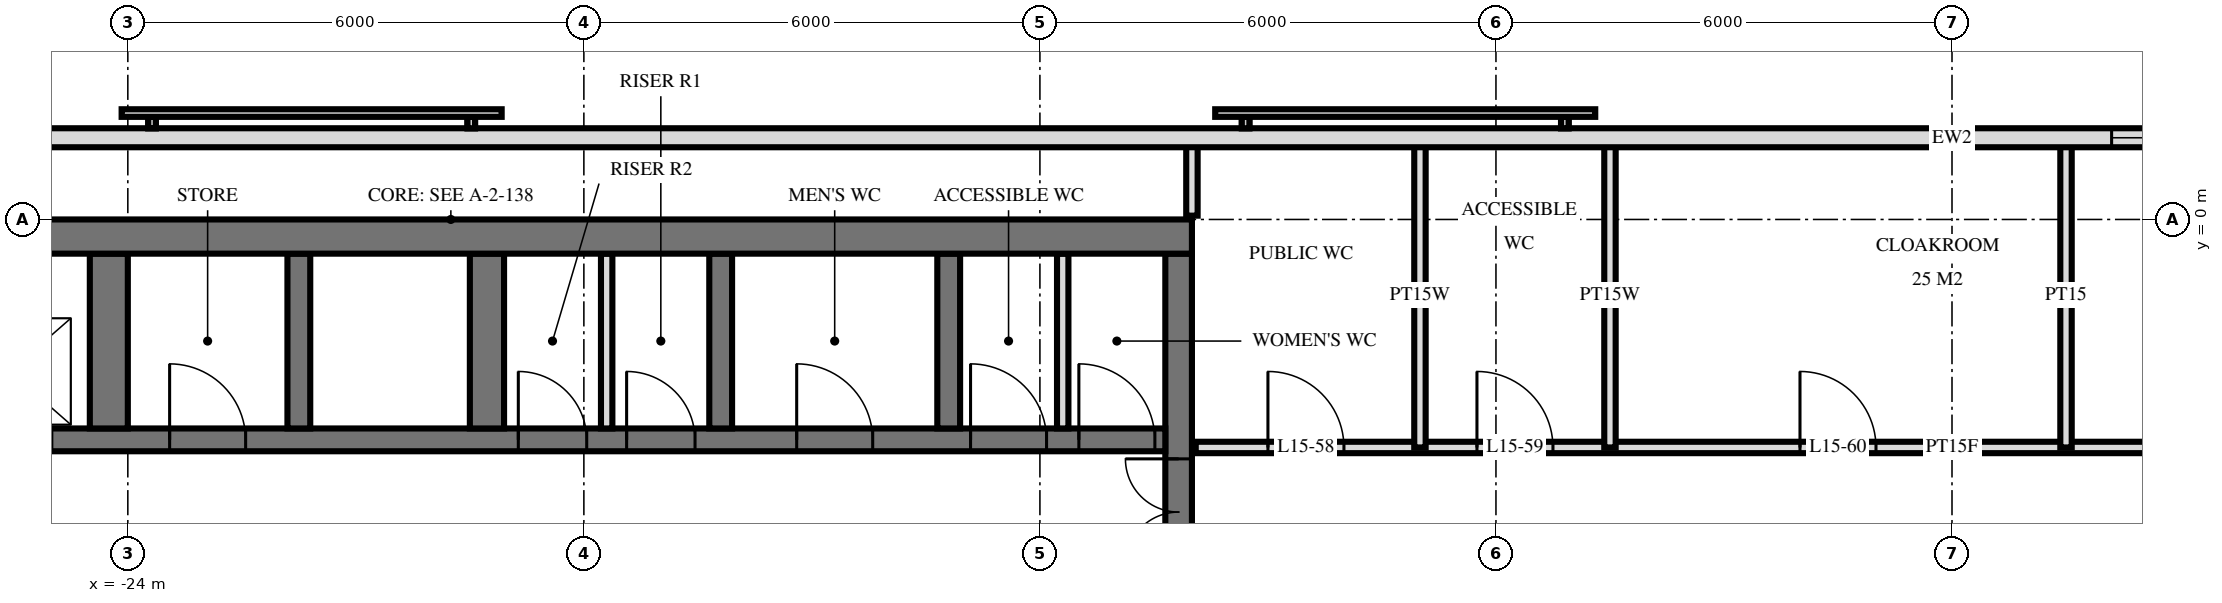
"""IFC4 building model, lengths in metres.
Left out: names, types, materials, properties, quantities, classifications, styles, units other than length and angle.
Written with IfcOpenShell. Run it as: python <this file> out.ifc"""

import sys

from ifc_helpers import new_model, si_unit, direction, frame, frame_2d, origin, place, context, subcontext, project, spatial, rectangle, extrude, element, fill, save


model = new_model("IFC4")
c1 = context("Model", 3, precision=1e-05, world=origin(), true_north=direction((0.0, 1.0)))
c2 = subcontext(c1, "Body", "Model", "MODEL_VIEW")
j1 = project(units=[si_unit("LENGTHUNIT", "METRE"), si_unit("PLANEANGLEUNIT", "RADIAN")], contexts=[c1])
p1 = place(None, origin())
s1 = spatial("IfcSite", under=j1, at=p1, CompositionType="ELEMENT")
p2 = place(p1, origin())
s2 = spatial("IfcBuilding", under=s1, at=p2, CompositionType="ELEMENT")
p3 = place(p2, frame((0.0, 0.0, 63.6)))
s3 = spatial("IfcBuildingStorey", under=s2, at=p3, CompositionType="ELEMENT", Elevation=63.6)
p4 = place(p3, frame((-29.5, -0.225, 0.0), z_axis=(0.0, 0.0, 1.0), x_axis=(1.0, 0.0, 0.0)))
e1 = element("IfcWall", 1, at=p4, inside=s3, PredefinedType="SHEAR", context=c2, shape_type="SweptSolid", body=[
    extrude(rectangle(XDim=19.5, YDim=0.45, at=frame_2d((9.75, 0.0))), origin(), (0.0, 0.0, 1.0), 3.6),
])
p5 = place(p3, frame((-10.175, -14.55, 0.0), z_axis=(0.0, 0.0, 1.0), x_axis=(0.0, 1.0, 0.0)))
e2 = element("IfcWall", 2, at=p5, inside=s3, PredefinedType="SHEAR", context=c2, shape_type="SweptSolid", body=[
    extrude(rectangle(XDim=14.1, YDim=0.35, at=frame_2d((7.05, 0.0))), origin(), (0.0, 0.0, 1.0), 3.6),
])
p6 = place(p5, frame((8.4, 0.0, 0.0)))
e3 = element("IfcOpeningElement", 3, at=p6, cuts=e2, PredefinedType="OPENING", context=c2, shape_type="SweptSolid", body=[
    extrude(rectangle(XDim=1.4, YDim=2.4, at=frame_2d((0.7, 1.2))), frame((0.0, 0.185, 0.0), z_axis=(0.0, -1.0, 0.0), x_axis=(1.0, 0.0, 0.0)), (0.0, 0.0, 1.0), 0.37),
])
p7 = place(p5, frame((10.0, 0.0, 0.0)))
e4 = element("IfcOpeningElement", 4, at=p7, cuts=e2, PredefinedType="OPENING", context=c2, shape_type="SweptSolid", body=[
    extrude(rectangle(XDim=1.4, YDim=2.4, at=frame_2d((0.7, 1.2))), frame((0.0, 0.185, 0.0), z_axis=(0.0, -1.0, 0.0), x_axis=(1.0, 0.0, 0.0)), (0.0, 0.0, 1.0), 0.37),
])
p8 = place(p5, frame((4.0, 0.0, 0.0)))
e5 = element("IfcOpeningElement", 5, at=p8, cuts=e2, PredefinedType="OPENING", context=c2, shape_type="SweptSolid", body=[
    extrude(rectangle(XDim=1.2, YDim=2.1, at=frame_2d((0.6, 1.05))), frame((0.0, 0.185, 0.0), z_axis=(0.0, -1.0, 0.0), x_axis=(1.0, 0.0, 0.0)), (0.0, 0.0, 1.0), 0.37),
])
p9 = place(p3, frame((-29.05, -2.9, 0.0), z_axis=(0.0, 0.0, 1.0), x_axis=(1.0, 0.0, 0.0)))
e6 = element("IfcWall", 6, at=p9, inside=s3, PredefinedType="SHEAR", context=c2, shape_type="SweptSolid", body=[
    extrude(rectangle(XDim=18.7, YDim=0.3, at=frame_2d((9.35, 0.0))), origin(), (0.0, 0.0, 1.0), 3.6),
])
p10 = place(p9, frame((2.95, 0.0, 0.0)))
e7 = element("IfcOpeningElement", 7, at=p10, cuts=e6, PredefinedType="OPENING", context=c2, shape_type="SweptSolid", body=[
    extrude(rectangle(XDim=1.1, YDim=2.1, at=frame_2d((0.55, 1.05))), frame((0.0, 0.16, 0.0), z_axis=(0.0, -1.0, 0.0), x_axis=(1.0, 0.0, 0.0)), (0.0, 0.0, 1.0), 0.32),
])
p11 = place(p9, frame((0.55, 0.0, 0.0)))
e8 = element("IfcOpeningElement", 8, at=p11, cuts=e6, PredefinedType="OPENING", context=c2, shape_type="SweptSolid", body=[
    extrude(rectangle(XDim=1.1, YDim=2.1, at=frame_2d((0.55, 1.05))), frame((0.0, 0.16, 0.0), z_axis=(0.0, -1.0, 0.0), x_axis=(1.0, 0.0, 0.0)), (0.0, 0.0, 1.0), 0.32),
])
p12 = place(p9, frame((11.613, 0.0, 0.0)))
e9 = element("IfcOpeningElement", 9, at=p12, cuts=e6, PredefinedType="OPENING", context=c2, shape_type="SweptSolid", body=[
    extrude(rectangle(XDim=0.9, YDim=2.1, at=frame_2d((0.45, 1.05))), frame((0.0, 0.16, 0.0), z_axis=(0.0, -1.0, 0.0), x_axis=(1.0, 0.0, 0.0)), (0.0, 0.0, 1.0), 0.32),
])
p13 = place(p9, frame((10.188, 0.0, 0.0)))
e10 = element("IfcOpeningElement", 10, at=p13, cuts=e6, PredefinedType="OPENING", context=c2, shape_type="SweptSolid", body=[
    extrude(rectangle(XDim=0.9, YDim=2.1, at=frame_2d((0.45, 1.05))), frame((0.0, 0.16, 0.0), z_axis=(0.0, -1.0, 0.0), x_axis=(1.0, 0.0, 0.0)), (0.0, 0.0, 1.0), 0.32),
])
p14 = place(p9, frame((17.562, 0.0, 0.0)))
e11 = element("IfcOpeningElement", 11, at=p14, cuts=e6, PredefinedType="OPENING", context=c2, shape_type="SweptSolid", body=[
    extrude(rectangle(XDim=1.0, YDim=2.1, at=frame_2d((0.5, 1.05))), frame((0.0, 0.16, 0.0), z_axis=(0.0, -1.0, 0.0), x_axis=(1.0, 0.0, 0.0)), (0.0, 0.0, 1.0), 0.32),
])
p15 = place(p9, frame((16.137, 0.0, 0.0)))
e12 = element("IfcOpeningElement", 12, at=p15, cuts=e6, PredefinedType="OPENING", context=c2, shape_type="SweptSolid", body=[
    extrude(rectangle(XDim=1.0, YDim=2.1, at=frame_2d((0.5, 1.05))), frame((0.0, 0.16, 0.0), z_axis=(0.0, -1.0, 0.0), x_axis=(1.0, 0.0, 0.0)), (0.0, 0.0, 1.0), 0.32),
])
p16 = place(p9, frame((13.85, 0.0, 0.0)))
e13 = element("IfcOpeningElement", 13, at=p16, cuts=e6, PredefinedType="OPENING", context=c2, shape_type="SweptSolid", body=[
    extrude(rectangle(XDim=1.0, YDim=2.1, at=frame_2d((0.5, 1.05))), frame((0.0, 0.16, 0.0), z_axis=(0.0, -1.0, 0.0), x_axis=(1.0, 0.0, 0.0)), (0.0, 0.0, 1.0), 0.32),
])
p17 = place(p9, frame((5.6, 0.0, 0.0)))
e14 = element("IfcOpeningElement", 14, at=p17, cuts=e6, PredefinedType="OPENING", context=c2, shape_type="SweptSolid", body=[
    extrude(rectangle(XDim=1.0, YDim=2.1, at=frame_2d((0.5, 1.05))), frame((0.0, 0.16, 0.0), z_axis=(0.0, -1.0, 0.0), x_axis=(1.0, 0.0, 0.0)), (0.0, 0.0, 1.0), 0.32),
])
for number, where, z_axis, x_axis in (
    (15, (-13.2, -2.75, 0.0), (0.0, 0.0, 1.0), (0.0, 1.0, 0.0)),
    (16, (-16.2, -2.75, 0.0), (0.0, 0.0, 1.0), (0.0, 1.0, 0.0)),
):
    element("IfcWall", number, at=place(p3, frame(where, z_axis=z_axis, x_axis=x_axis)), inside=s3, PredefinedType="SHEAR", context=c2, shape_type="SweptSolid", body=[
        extrude(rectangle(XDim=2.3, YDim=0.3, at=frame_2d((1.15, 0.0))), origin(), (0.0, 0.0, 1.0), 3.6),
    ])
p18 = place(p3, frame((-19.275, -2.75, 0.0), z_axis=(0.0, 0.0, 1.0), x_axis=(0.0, 1.0, 0.0)))
e17 = element("IfcWall", 17, at=p18, inside=s3, PredefinedType="SHEAR", context=c2, shape_type="SweptSolid", body=[
    extrude(rectangle(XDim=2.3, YDim=0.45, at=frame_2d((1.15, 0.0))), origin(), (0.0, 0.0, 1.0), 3.6),
])
p19 = place(p3, frame((-21.75, -2.75, 0.0), z_axis=(0.0, 0.0, 1.0), x_axis=(0.0, 1.0, 0.0)))
e18 = element("IfcWall", 18, at=p19, inside=s3, PredefinedType="SHEAR", context=c2, shape_type="SweptSolid", body=[
    extrude(rectangle(XDim=2.3, YDim=0.3, at=frame_2d((1.15, 0.0))), origin(), (0.0, 0.0, 1.0), 3.6),
])
p20 = place(p3, frame((-24.25, -2.75, 0.0), z_axis=(0.0, 0.0, 1.0), x_axis=(0.0, 1.0, 0.0)))
e19 = element("IfcWall", 19, at=p20, inside=s3, PredefinedType="SHEAR", context=c2, shape_type="SweptSolid", body=[
    extrude(rectangle(XDim=2.3, YDim=0.5, at=frame_2d((1.15, 0.0))), origin(), (0.0, 0.0, 1.0), 3.6),
])
p21 = place(p3, frame((28.775, 1.075, 0.0), z_axis=(0.0, 0.0, 1.0), x_axis=(-1.0, 0.0, 0.0)))
e20 = element("IfcWall", 20, at=p21, inside=s3, PredefinedType="SOLIDWALL", context=c2, shape_type="SweptSolid", body=[
    extrude(rectangle(XDim=57.551, YDim=0.25, at=frame_2d((28.775, 0.0))), origin(), (0.0, 0.0, 1.0), 3.32),
])
p22 = place(p21, frame((21.275, 0.0, 0.3)))
e21 = element("IfcOpeningElement", 21, at=p22, cuts=e20, PredefinedType="OPENING", context=c2, shape_type="SweptSolid", body=[
    extrude(rectangle(XDim=2.4, YDim=2.1, at=frame_2d((1.2, 1.05))), frame((0.0, 0.135, 0.0), z_axis=(0.0, -1.0, 0.0), x_axis=(1.0, 0.0, 0.0)), (0.0, 0.0, 1.0), 0.27),
])
p23 = place(p21, frame((24.275, 0.0, 0.3)))
e22 = element("IfcOpeningElement", 22, at=p23, cuts=e20, PredefinedType="OPENING", context=c2, shape_type="SweptSolid", body=[
    extrude(rectangle(XDim=2.4, YDim=2.1, at=frame_2d((1.2, 1.05))), frame((0.0, 0.135, 0.0), z_axis=(0.0, -1.0, 0.0), x_axis=(1.0, 0.0, 0.0)), (0.0, 0.0, 1.0), 0.27),
])
for number, where, z_axis, x_axis in (
    (23, (-17.7, -2.75, 0.0), (0.0, 0.0, 1.0), (0.0, 1.0, 0.0)),
    (24, (-11.7, -2.75, 0.0), (0.0, 0.0, 1.0), (0.0, 1.0, 0.0)),
):
    element("IfcWall", number, at=place(p3, frame(where, z_axis=z_axis, x_axis=x_axis)), inside=s3, PredefinedType="PARTITIONING", context=c2, shape_type="SweptSolid", body=[
        extrude(rectangle(XDim=2.3, YDim=0.15, at=frame_2d((1.15, 0.0))), origin(), (0.0, 0.0, 1.0), 3.3),
    ])
p24 = place(p3, frame((1.5, -3.0, 0.0), z_axis=(0.0, 0.0, 1.0), x_axis=(0.0, 1.0, 0.0)))
e25 = element("IfcWall", 25, at=p24, inside=s3, PredefinedType="PARTITIONING", context=c2, shape_type="SweptSolid", body=[
    extrude(rectangle(XDim=4.02, YDim=0.15, at=frame_2d((2.01, 0.0))), origin(), (0.0, 0.0, 1.0), 3.32),
])
for number, where, z_axis, x_axis in (
    (26, (-4.5, -3.0, 0.0), (0.0, 0.0, 1.0), (0.0, 1.0, 0.0)),
    (27, (-7.0, -3.0, 0.0), (0.0, 0.0, 1.0), (0.0, 1.0, 0.0)),
):
    element("IfcWall", number, at=place(p3, frame(where, z_axis=z_axis, x_axis=x_axis)), inside=s3, PredefinedType="PLUMBINGWALL", context=c2, shape_type="SweptSolid", body=[
        extrude(rectangle(XDim=4.02, YDim=0.15, at=frame_2d((2.01, 0.0))), origin(), (0.0, 0.0, 1.0), 3.32),
    ])
p25 = place(p3, frame((-10.0, 0.05, 0.0), z_axis=(0.0, 0.0, 1.0), x_axis=(0.0, 1.0, 0.0)))
e28 = element("IfcWall", 28, at=p25, inside=s3, PredefinedType="PLUMBINGWALL", context=c2, shape_type="SweptSolid", body=[
    extrude(rectangle(XDim=0.97, YDim=0.15, at=frame_2d((0.485, 0.0))), origin(), (0.0, 0.0, 1.0), 3.32),
])
p26 = place(p3, frame((-9.95, -3.0, 0.0), z_axis=(0.0, 0.0, 1.0), x_axis=(1.0, 0.0, 0.0)))
e29 = element("IfcWall", 29, at=p26, inside=s3, PredefinedType="PARTITIONING", context=c2, shape_type="SweptSolid", body=[
    extrude(rectangle(XDim=19.9, YDim=0.15, at=frame_2d((9.95, 0.0))), origin(), (0.0, 0.0, 1.0), 3.32),
])
p27 = place(p26, frame((0.95, 0.0, 0.0)))
e30 = element("IfcOpeningElement", 30, at=p27, cuts=e29, PredefinedType="OPENING", context=c2, shape_type="SweptSolid", body=[
    extrude(rectangle(XDim=1.0, YDim=2.1, at=frame_2d((0.5, 1.05))), frame((0.0, 0.085, 0.0), z_axis=(0.0, -1.0, 0.0), x_axis=(1.0, 0.0, 0.0)), (0.0, 0.0, 1.0), 0.17),
])
p28 = place(p26, frame((3.7, 0.0, 0.0)))
e31 = element("IfcOpeningElement", 31, at=p28, cuts=e29, PredefinedType="OPENING", context=c2, shape_type="SweptSolid", body=[
    extrude(rectangle(XDim=1.0, YDim=2.1, at=frame_2d((0.5, 1.05))), frame((0.0, 0.085, 0.0), z_axis=(0.0, -1.0, 0.0), x_axis=(1.0, 0.0, 0.0)), (0.0, 0.0, 1.0), 0.17),
])
p29 = place(p26, frame((7.95, 0.0, 0.0)))
e32 = element("IfcOpeningElement", 32, at=p29, cuts=e29, PredefinedType="OPENING", context=c2, shape_type="SweptSolid", body=[
    extrude(rectangle(XDim=1.0, YDim=2.1, at=frame_2d((0.5, 1.05))), frame((0.0, 0.085, 0.0), z_axis=(0.0, -1.0, 0.0), x_axis=(1.0, 0.0, 0.0)), (0.0, 0.0, 1.0), 0.17),
])
p30 = place(p26, frame((15.2, 0.0, 0.0)))
e33 = element("IfcOpeningElement", 33, at=p30, cuts=e29, PredefinedType="OPENING", context=c2, shape_type="SweptSolid", body=[
    extrude(rectangle(XDim=1.0, YDim=2.1, at=frame_2d((0.5, 1.05))), frame((0.0, 0.085, 0.0), z_axis=(0.0, -1.0, 0.0), x_axis=(1.0, 0.0, 0.0)), (0.0, 0.0, 1.0), 0.17),
])
p31 = place(p23, origin())
e34 = element("IfcWindow", 34, at=p31, inside=s3, PartitioningType="SINGLE_PANEL", PredefinedType="WINDOW", context=c2, shape_type="SweptSolid", body=[
    extrude(rectangle(XDim=2.4, YDim=2.1, at=frame_2d((1.2, 1.05))), frame((0.0, 0.03, 0.0), z_axis=(0.0, -1.0, 0.0), x_axis=(1.0, 0.0, 0.0)), (0.0, 0.0, 1.0), 0.06),
])
fill(e22, e34)
p32 = place(p7, origin())
e35 = element("IfcDoor", 35, at=p32, inside=s3, OperationType="DOUBLE_DOOR_SINGLE_SWING", PredefinedType="DOOR", context=c2, shape_type="SweptSolid", body=[
    extrude(rectangle(XDim=1.4, YDim=2.4, at=frame_2d((0.7, 1.2))), frame((0.0, 0.025, 0.0), z_axis=(0.0, -1.0, 0.0), x_axis=(1.0, 0.0, 0.0)), (0.0, 0.0, 1.0), 0.05),
])
fill(e4, e35)
p33 = place(p12, origin())
e36 = element("IfcDoor", 36, at=p33, inside=s3, OperationType="SINGLE_SWING_RIGHT", PredefinedType="DOOR", context=c2, shape_type="SweptSolid", body=[
    extrude(rectangle(XDim=0.9, YDim=2.1, at=frame_2d((0.45, 1.05))), frame((0.0, 0.025, 0.0), z_axis=(0.0, -1.0, 0.0), x_axis=(1.0, 0.0, 0.0)), (0.0, 0.0, 1.0), 0.05),
])
fill(e9, e36)
p34 = place(p13, origin())
e37 = element("IfcDoor", 37, at=p34, inside=s3, OperationType="SINGLE_SWING_RIGHT", PredefinedType="DOOR", context=c2, shape_type="SweptSolid", body=[
    extrude(rectangle(XDim=0.9, YDim=2.1, at=frame_2d((0.45, 1.05))), frame((0.0, 0.025, 0.0), z_axis=(0.0, -1.0, 0.0), x_axis=(1.0, 0.0, 0.0)), (0.0, 0.0, 1.0), 0.05),
])
fill(e10, e37)
p35 = place(p14, origin())
e38 = element("IfcDoor", 38, at=p35, inside=s3, OperationType="SINGLE_SWING_RIGHT", PredefinedType="DOOR", context=c2, shape_type="SweptSolid", body=[
    extrude(rectangle(XDim=1.0, YDim=2.1, at=frame_2d((0.5, 1.05))), frame((0.0, 0.025, 0.0), z_axis=(0.0, -1.0, 0.0), x_axis=(1.0, 0.0, 0.0)), (0.0, 0.0, 1.0), 0.05),
])
fill(e11, e38)
p36 = place(p15, origin())
e39 = element("IfcDoor", 39, at=p36, inside=s3, OperationType="SINGLE_SWING_RIGHT", PredefinedType="DOOR", context=c2, shape_type="SweptSolid", body=[
    extrude(rectangle(XDim=1.0, YDim=2.1, at=frame_2d((0.5, 1.05))), frame((0.0, 0.025, 0.0), z_axis=(0.0, -1.0, 0.0), x_axis=(1.0, 0.0, 0.0)), (0.0, 0.0, 1.0), 0.05),
])
fill(e12, e39)
p37 = place(p16, origin())
e40 = element("IfcDoor", 40, at=p37, inside=s3, OperationType="SINGLE_SWING_RIGHT", PredefinedType="DOOR", context=c2, shape_type="SweptSolid", body=[
    extrude(rectangle(XDim=1.0, YDim=2.1, at=frame_2d((0.5, 1.05))), frame((0.0, 0.025, 0.0), z_axis=(0.0, -1.0, 0.0), x_axis=(1.0, 0.0, 0.0)), (0.0, 0.0, 1.0), 0.05),
])
fill(e13, e40)
p38 = place(p17, origin())
e41 = element("IfcDoor", 41, at=p38, inside=s3, OperationType="SINGLE_SWING_RIGHT", PredefinedType="DOOR", context=c2, shape_type="SweptSolid", body=[
    extrude(rectangle(XDim=1.0, YDim=2.1, at=frame_2d((0.5, 1.05))), frame((0.0, 0.025, 0.0), z_axis=(0.0, -1.0, 0.0), x_axis=(1.0, 0.0, 0.0)), (0.0, 0.0, 1.0), 0.05),
])
fill(e14, e41)
p39 = place(p27, origin())
e42 = element("IfcDoor", 42, at=p39, inside=s3, OperationType="SINGLE_SWING_RIGHT", PredefinedType="DOOR", context=c2, shape_type="SweptSolid", body=[
    extrude(rectangle(XDim=1.0, YDim=2.1, at=frame_2d((0.5, 1.05))), frame((0.0, 0.025, 0.0), z_axis=(0.0, -1.0, 0.0), x_axis=(1.0, 0.0, 0.0)), (0.0, 0.0, 1.0), 0.05),
])
fill(e30, e42)
p40 = place(p28, origin())
e43 = element("IfcDoor", 43, at=p40, inside=s3, OperationType="SINGLE_SWING_RIGHT", PredefinedType="DOOR", context=c2, shape_type="SweptSolid", body=[
    extrude(rectangle(XDim=1.0, YDim=2.1, at=frame_2d((0.5, 1.05))), frame((0.0, 0.025, 0.0), z_axis=(0.0, -1.0, 0.0), x_axis=(1.0, 0.0, 0.0)), (0.0, 0.0, 1.0), 0.05),
])
fill(e31, e43)
p41 = place(p29, origin())
e44 = element("IfcDoor", 44, at=p41, inside=s3, OperationType="SINGLE_SWING_RIGHT", PredefinedType="DOOR", context=c2, shape_type="SweptSolid", body=[
    extrude(rectangle(XDim=1.0, YDim=2.1, at=frame_2d((0.5, 1.05))), frame((0.0, 0.025, 0.0), z_axis=(0.0, -1.0, 0.0), x_axis=(1.0, 0.0, 0.0)), (0.0, 0.0, 1.0), 0.05),
])
fill(e32, e44)
save(model, sys.argv[1])
